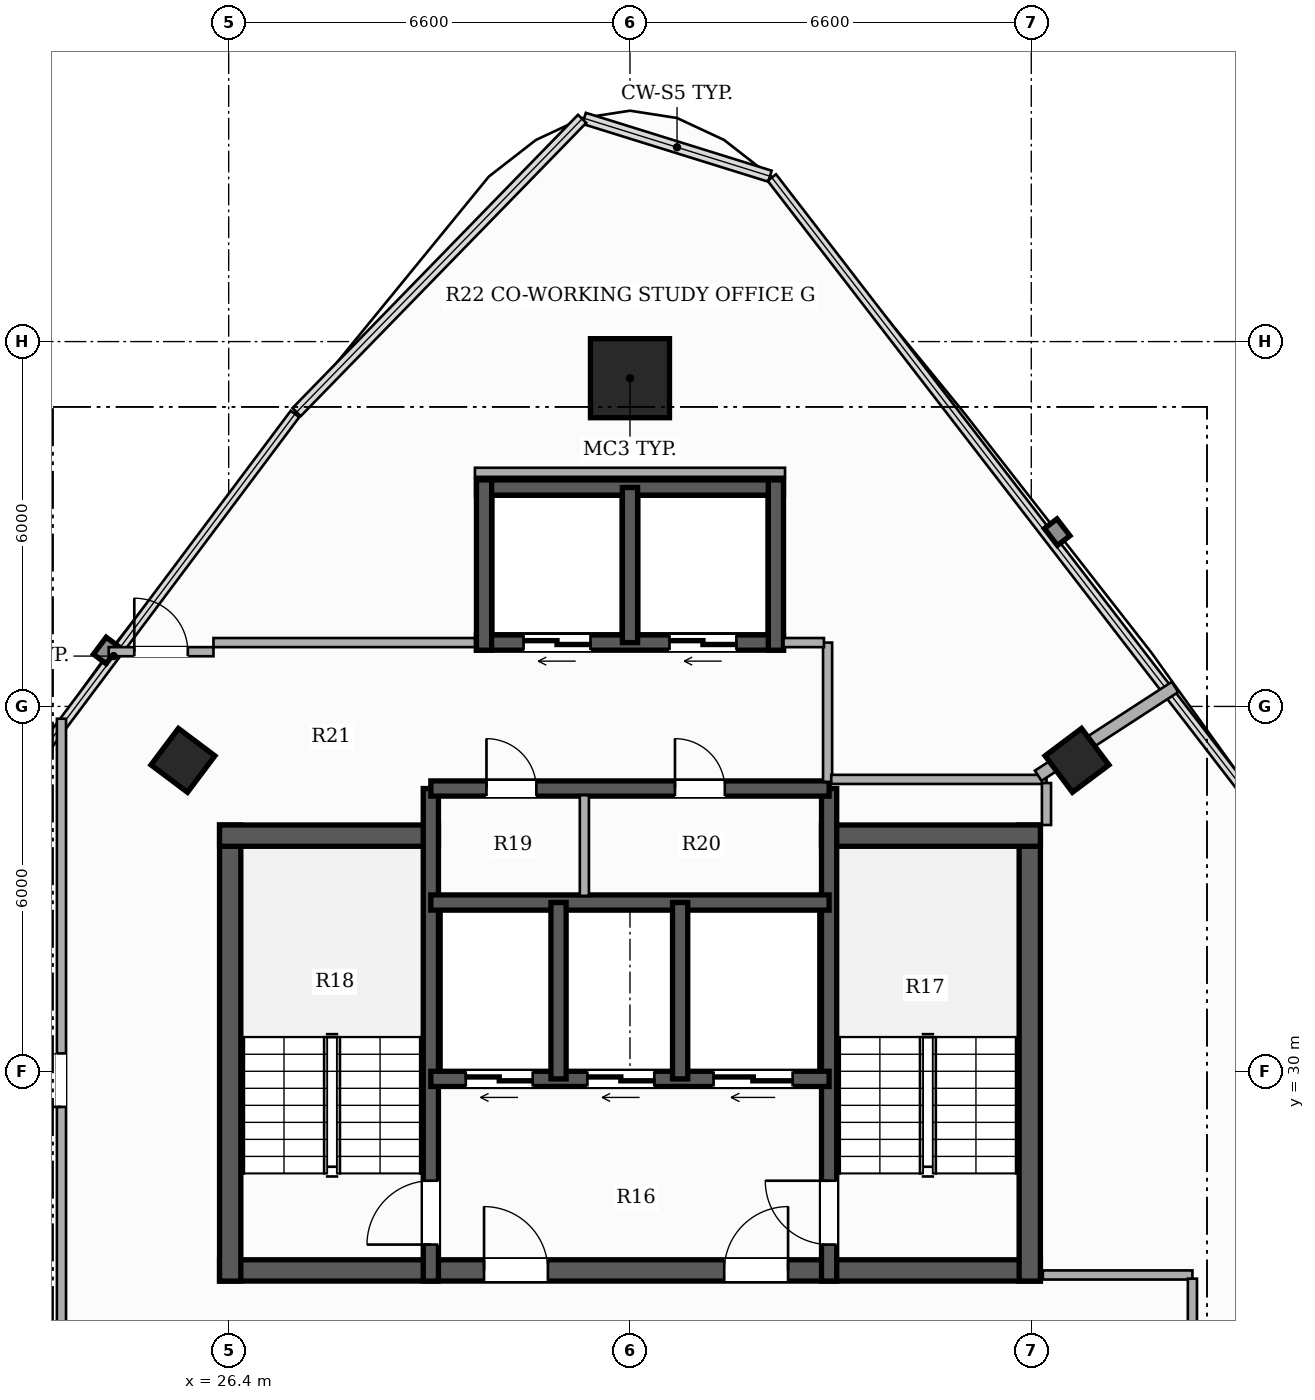
"""IFC4 building model, lengths in metres.
Left out: names, types, materials, properties, quantities, classifications, styles, units other than length and angle.
Written with IfcOpenShell. Run it as: python <this file> out.ifc"""

import sys

from ifc_helpers import new_model, si_unit, direction, frame, frame_2d, origin, origin_2d, place, context, subcontext, project, spatial, rectangle, hollow_rectangle, extrude, element, fill, save


model = new_model("IFC4")
c1 = context("Model", 3, precision=1e-05, world=origin(), true_north=direction((0.0, 1.0)))
c2 = subcontext(c1, "Body", "Model", "MODEL_VIEW")
j1 = project(units=[si_unit("LENGTHUNIT", "METRE"), si_unit("PLANEANGLEUNIT", "RADIAN")], contexts=[c1])
p1 = place(None, origin())
s1 = spatial("IfcSite", under=j1, at=p1, CompositionType="ELEMENT")
p2 = place(p1, origin())
s2 = spatial("IfcBuilding", under=s1, at=p2, CompositionType="ELEMENT")
p3 = place(p2, frame((0.0, 0.0, 229.4)))
s3 = spatial("IfcBuildingStorey", under=s2, at=p3, CompositionType="ELEMENT", Elevation=229.4)
p4 = place(p3, frame((26.25, 26.725, 0.0), z_axis=(0.0, 0.0, 1.0), x_axis=(1.0, 0.0, 0.0)))
e1 = element("IfcWall", 1, at=p4, inside=s3, PredefinedType="SHEAR", context=c2, shape_type="SweptSolid", body=[
    extrude(rectangle(XDim=13.5, YDim=0.35, at=frame_2d((6.75, 0.0))), origin(), (0.0, 0.0, 1.0), 3.3),
])
p5 = place(p4, frame((4.35, 0.0, 0.0)))
e2 = element("IfcOpeningElement", 2, at=p5, cuts=e1, PredefinedType="OPENING", context=c2, shape_type="SweptSolid", body=[
    extrude(rectangle(XDim=1.05, YDim=2.15, at=frame_2d((0.525, 1.075))), frame((0.0, 0.185, 0.0), z_axis=(0.0, -1.0, 0.0), x_axis=(1.0, 0.0, 0.0)), (0.0, 0.0, 1.0), 0.37),
])
p6 = place(p4, frame((8.3, 0.0, 0.0)))
e3 = element("IfcOpeningElement", 3, at=p6, cuts=e1, PredefinedType="OPENING", context=c2, shape_type="SweptSolid", body=[
    extrude(rectangle(XDim=1.05, YDim=2.15, at=frame_2d((0.525, 1.075))), frame((0.0, 0.185, 0.0), z_axis=(0.0, -1.0, 0.0), x_axis=(1.0, 0.0, 0.0)), (0.0, 0.0, 1.0), 0.37),
])
p7 = place(p3, frame((26.425, 26.55, 0.0), z_axis=(0.0, 0.0, 1.0), x_axis=(0.0, 1.0, 0.0)))
e4 = element("IfcWall", 4, at=p7, inside=s3, PredefinedType="SHEAR", context=c2, shape_type="SweptSolid", body=[
    extrude(rectangle(XDim=7.5, YDim=0.35, at=frame_2d((3.75, 0.0))), origin(), (0.0, 0.0, 1.0), 3.3),
])
p8 = place(p3, frame((26.25, 33.875, 0.0), z_axis=(0.0, 0.0, 1.0), x_axis=(1.0, 0.0, 0.0)))
e5 = element("IfcWall", 5, at=p8, inside=s3, PredefinedType="SHEAR", context=c2, shape_type="SweptSolid", body=[
    extrude(rectangle(XDim=3.6, YDim=0.35, at=frame_2d((1.8, 0.0))), origin(), (0.0, 0.0, 1.0), 3.3),
])
p9 = place(p3, frame((39.575, 26.55, 0.0), z_axis=(0.0, 0.0, 1.0), x_axis=(0.0, 1.0, 0.0)))
e6 = element("IfcWall", 6, at=p9, inside=s3, PredefinedType="SHEAR", context=c2, shape_type="SweptSolid", body=[
    extrude(rectangle(XDim=7.5, YDim=0.35, at=frame_2d((3.75, 0.0))), origin(), (0.0, 0.0, 1.0), 3.3),
])
p10 = place(p3, frame((36.15, 33.875, 0.0), z_axis=(0.0, 0.0, 1.0), x_axis=(1.0, 0.0, 0.0)))
e7 = element("IfcWall", 7, at=p10, inside=s3, PredefinedType="SHEAR", context=c2, shape_type="SweptSolid", body=[
    extrude(rectangle(XDim=3.6, YDim=0.35, at=frame_2d((1.8, 0.0))), origin(), (0.0, 0.0, 1.0), 3.3),
])
p11 = place(p3, frame((29.725, 26.55, 0.0), z_axis=(0.0, 0.0, 1.0), x_axis=(0.0, 1.0, 0.0)))
e8 = element("IfcWall", 8, at=p11, inside=s3, PredefinedType="SHEAR", context=c2, shape_type="SweptSolid", body=[
    extrude(rectangle(XDim=8.1, YDim=0.25, at=frame_2d((4.05, 0.0))), origin(), (0.0, 0.0, 1.0), 3.3),
])
p12 = place(p11, frame((0.6, 0.0, 0.0)))
e9 = element("IfcOpeningElement", 9, at=p12, cuts=e8, PredefinedType="OPENING", context=c2, shape_type="SweptSolid", body=[
    extrude(rectangle(XDim=1.05, YDim=2.15, at=frame_2d((0.525, 1.075))), frame((0.0, 0.135, 0.0), z_axis=(0.0, -1.0, 0.0), x_axis=(1.0, 0.0, 0.0)), (0.0, 0.0, 1.0), 0.27),
])
p13 = place(p3, frame((36.275, 26.55, 0.0), z_axis=(0.0, 0.0, 1.0), x_axis=(0.0, 1.0, 0.0)))
e10 = element("IfcWall", 10, at=p13, inside=s3, PredefinedType="SHEAR", context=c2, shape_type="SweptSolid", body=[
    extrude(rectangle(XDim=8.1, YDim=0.25, at=frame_2d((4.05, 0.0))), origin(), (0.0, 0.0, 1.0), 3.3),
])
p14 = place(p13, frame((0.6, 0.0, 0.0)))
e11 = element("IfcOpeningElement", 11, at=p14, cuts=e10, PredefinedType="OPENING", context=c2, shape_type="SweptSolid", body=[
    extrude(rectangle(XDim=1.05, YDim=2.15, at=frame_2d((0.525, 1.075))), frame((0.0, 0.135, 0.0), z_axis=(0.0, -1.0, 0.0), x_axis=(1.0, 0.0, 0.0)), (0.0, 0.0, 1.0), 0.27),
])
p15 = place(p3, frame((36.275, 29.875, 0.0), z_axis=(0.0, 0.0, 1.0), x_axis=(-1.0, 0.0, 0.0)))
e12 = element("IfcWall", 12, at=p15, inside=s3, PredefinedType="SHEAR", context=c2, shape_type="SweptSolid", body=[
    extrude(rectangle(XDim=6.55, YDim=0.25, at=frame_2d((3.275, 0.0))), origin(), (0.0, 0.0, 1.0), 3.3),
])
p16 = place(p15, frame((4.875, 0.0, 0.0)))
e13 = element("IfcOpeningElement", 13, at=p16, cuts=e12, PredefinedType="OPENING", context=c2, shape_type="SweptSolid", body=[
    extrude(rectangle(XDim=1.1, YDim=2.2, at=frame_2d((0.55, 1.1))), frame((0.0, 0.135, 0.0), z_axis=(0.0, -1.0, 0.0), x_axis=(1.0, 0.0, 0.0)), (0.0, 0.0, 1.0), 0.27),
])
p17 = place(p15, frame((2.875, 0.0, 0.0)))
e14 = element("IfcOpeningElement", 14, at=p17, cuts=e12, PredefinedType="OPENING", context=c2, shape_type="SweptSolid", body=[
    extrude(rectangle(XDim=1.1, YDim=2.2, at=frame_2d((0.55, 1.1))), frame((0.0, 0.135, 0.0), z_axis=(0.0, -1.0, 0.0), x_axis=(1.0, 0.0, 0.0)), (0.0, 0.0, 1.0), 0.27),
])
p18 = place(p15, frame((0.6, 0.0, 0.0)))
e15 = element("IfcOpeningElement", 15, at=p18, cuts=e12, PredefinedType="OPENING", context=c2, shape_type="SweptSolid", body=[
    extrude(rectangle(XDim=1.3, YDim=2.2, at=frame_2d((0.65, 1.1))), frame((0.0, 0.135, 0.0), z_axis=(0.0, -1.0, 0.0), x_axis=(1.0, 0.0, 0.0)), (0.0, 0.0, 1.0), 0.27),
])
p19 = place(p3, frame((29.725, 32.775, 0.0), z_axis=(0.0, 0.0, 1.0), x_axis=(1.0, 0.0, 0.0)))
e16 = element("IfcWall", 16, at=p19, inside=s3, PredefinedType="SHEAR", context=c2, shape_type="SweptSolid", body=[
    extrude(rectangle(XDim=6.55, YDim=0.25, at=frame_2d((3.275, 0.0))), origin(), (0.0, 0.0, 1.0), 3.3),
])
for number, where, z_axis, x_axis in (
    (17, (31.825, 29.875, 0.0), (0.0, 0.0, 1.0), (0.0, 1.0, 0.0)),
    (18, (33.825, 29.875, 0.0), (0.0, 0.0, 1.0), (0.0, 1.0, 0.0)),
):
    element("IfcWall", number, at=place(p3, frame(where, z_axis=z_axis, x_axis=x_axis)), inside=s3, PredefinedType="SHEAR", context=c2, shape_type="SweptSolid", body=[
        extrude(rectangle(XDim=2.9, YDim=0.25, at=frame_2d((1.45, 0.0))), origin(), (0.0, 0.0, 1.0), 3.3),
    ])
p20 = place(p3, frame((29.725, 34.65, 0.0), z_axis=(0.0, 0.0, 1.0), x_axis=(1.0, 0.0, 0.0)))
e19 = element("IfcWall", 19, at=p20, inside=s3, PredefinedType="SHEAR", context=c2, shape_type="SweptSolid", body=[
    extrude(rectangle(XDim=6.55, YDim=0.25, at=frame_2d((3.275, 0.0))), origin(), (0.0, 0.0, 1.0), 3.3),
])
p21 = place(p20, frame((0.915, 0.0, 0.0)))
e20 = element("IfcOpeningElement", 20, at=p21, cuts=e19, PredefinedType="OPENING", context=c2, shape_type="SweptSolid", body=[
    extrude(rectangle(XDim=0.82, YDim=2.1, at=frame_2d((0.41, 1.05))), frame((0.0, 0.135, 0.0), z_axis=(0.0, -1.0, 0.0), x_axis=(1.0, 0.0, 0.0)), (0.0, 0.0, 1.0), 0.27),
])
p22 = place(p20, frame((4.015, 0.0, 0.0)))
e21 = element("IfcOpeningElement", 21, at=p22, cuts=e19, PredefinedType="OPENING", context=c2, shape_type="SweptSolid", body=[
    extrude(rectangle(XDim=0.82, YDim=2.1, at=frame_2d((0.41, 1.05))), frame((0.0, 0.135, 0.0), z_axis=(0.0, -1.0, 0.0), x_axis=(1.0, 0.0, 0.0)), (0.0, 0.0, 1.0), 0.27),
])
p23 = place(p3, frame((35.525, 37.05, 0.0), z_axis=(0.0, 0.0, 1.0), x_axis=(-1.0, 0.0, 0.0)))
e22 = element("IfcWall", 22, at=p23, inside=s3, PredefinedType="SHEAR", context=c2, shape_type="SweptSolid", body=[
    extrude(rectangle(XDim=5.05, YDim=0.25, at=frame_2d((2.525, 0.0))), origin(), (0.0, 0.0, 1.0), 3.3),
])
p24 = place(p23, frame((3.175, 0.0, 0.0)))
e23 = element("IfcOpeningElement", 23, at=p24, cuts=e22, PredefinedType="OPENING", context=c2, shape_type="SweptSolid", body=[
    extrude(rectangle(XDim=1.1, YDim=2.2, at=frame_2d((0.55, 1.1))), frame((0.0, 0.135, 0.0), z_axis=(0.0, -1.0, 0.0), x_axis=(1.0, 0.0, 0.0)), (0.0, 0.0, 1.0), 0.27),
])
p25 = place(p23, frame((0.775, 0.0, 0.0)))
e24 = element("IfcOpeningElement", 24, at=p25, cuts=e22, PredefinedType="OPENING", context=c2, shape_type="SweptSolid", body=[
    extrude(rectangle(XDim=1.1, YDim=2.2, at=frame_2d((0.55, 1.1))), frame((0.0, 0.135, 0.0), z_axis=(0.0, -1.0, 0.0), x_axis=(1.0, 0.0, 0.0)), (0.0, 0.0, 1.0), 0.27),
])
p26 = place(p3, frame((30.475, 39.6, 0.0), z_axis=(0.0, 0.0, 1.0), x_axis=(1.0, 0.0, 0.0)))
e25 = element("IfcWall", 25, at=p26, inside=s3, PredefinedType="SHEAR", context=c2, shape_type="SweptSolid", body=[
    extrude(rectangle(XDim=5.05, YDim=0.25, at=frame_2d((2.525, 0.0))), origin(), (0.0, 0.0, 1.0), 3.3),
])
for number, where, z_axis, x_axis in (
    (26, (30.6, 36.925, 0.0), (0.0, 0.0, 1.0), (0.0, 1.0, 0.0)),
    (27, (35.4, 36.925, 0.0), (0.0, 0.0, 1.0), (0.0, 1.0, 0.0)),
):
    element("IfcWall", number, at=place(p3, frame(where, z_axis=z_axis, x_axis=x_axis)), inside=s3, PredefinedType="SHEAR", context=c2, shape_type="SweptSolid", body=[
        extrude(rectangle(XDim=2.8, YDim=0.25, at=frame_2d((1.4, 0.0))), origin(), (0.0, 0.0, 1.0), 3.3),
    ])
p27 = place(p3, frame((33.0, 37.05, 0.0), z_axis=(0.0, 0.0, 1.0), x_axis=(0.0, 1.0, 0.0)))
e28 = element("IfcWall", 28, at=p27, inside=s3, PredefinedType="SHEAR", context=c2, shape_type="SweptSolid", body=[
    extrude(rectangle(XDim=2.55, YDim=0.25, at=frame_2d((1.275, 0.0))), origin(), (0.0, 0.0, 1.0), 3.3),
])
p28 = place(p3, frame((33.0, 41.398, 0.0), z_axis=(0.0, 0.0, 1.0), x_axis=(1.0, 0.0, 0.0)))
e29 = element("IfcColumn", 29, at=p28, inside=s3, PredefinedType="COLUMN", context=c2, shape_type="SweptSolid", body=[
    extrude(hollow_rectangle(XDim=1.3, YDim=1.3, WallThickness=0.04, at=origin_2d()), origin(), (0.0, 0.0, 1.0), 3.3),
])
for number, where, z_axis, x_axis in (
    (30, (25.648, 35.113, 0.0), (0.0, 0.0, 1.0), (0.6, 0.8, 0.0)),
    (31, (40.352, 35.113, 0.0), (0.0, 0.0, 1.0), (-0.6, 0.8, 0.0)),
):
    element("IfcColumn", number, at=place(p3, frame(where, z_axis=z_axis, x_axis=x_axis)), inside=s3, PredefinedType="COLUMN", context=c2, shape_type="SweptSolid", body=[
        extrude(hollow_rectangle(XDim=0.75, YDim=0.75, WallThickness=0.025, at=origin_2d()), origin(), (0.0, 0.0, 1.0), 3.3),
    ])
p29 = place(p3, frame((36.25, 34.76, 0.0), z_axis=(0.0, 0.0, 1.0), x_axis=(0.0, 1.0, 0.0)))
e32 = element("IfcWall", 32, at=p29, inside=s3, PredefinedType="PARTITIONING", context=c2, shape_type="SweptSolid", body=[
    extrude(rectangle(XDim=2.29, YDim=0.15, at=frame_2d((1.145, 0.0))), origin(), (0.0, 0.0, 1.0), 2.425),
])
p30 = place(p3, frame((35.525, 37.05, 0.0), z_axis=(0.0, 0.0, 1.0), x_axis=(1.0, 0.0, 0.0)))
e33 = element("IfcWall", 33, at=p30, inside=s3, PredefinedType="PARTITIONING", context=c2, shape_type="SweptSolid", body=[
    extrude(rectangle(XDim=0.665, YDim=0.15, at=frame_2d((0.333, 0.0))), origin(), (0.0, 0.0, 1.0), 2.425),
])
p31 = place(p3, frame((32.25, 32.885, 0.0), z_axis=(0.0, 0.0, 1.0), x_axis=(0.0, 1.0, 0.0)))
e34 = element("IfcWall", 34, at=p31, inside=s3, PredefinedType="PARTITIONING", context=c2, shape_type="SweptSolid", body=[
    extrude(rectangle(XDim=1.655, YDim=0.15, at=frame_2d((0.828, 0.0))), origin(), (0.0, 0.0, 1.0), 3.06),
])
p32 = place(p3, frame((23.65, 23.91, 0.0), z_axis=(0.0, 0.0, 1.0), x_axis=(0.0, 1.0, 0.0)))
e35 = element("IfcWall", 35, at=p32, inside=s3, PredefinedType="PARTITIONING", context=c2, shape_type="SweptSolid", body=[
    extrude(rectangle(XDim=11.888, YDim=0.15, at=frame_2d((5.944, 0.0))), origin(), (0.0, 0.0, 1.0), 2.492),
])
p33 = place(p32, frame((5.504, 0.0, 0.0)))
e36 = element("IfcOpeningElement", 36, at=p33, cuts=e35, PredefinedType="OPENING", context=c2, shape_type="SweptSolid", body=[
    extrude(rectangle(XDim=0.88, YDim=2.1, at=frame_2d((0.44, 1.05))), frame((0.0, 0.085, 0.0), z_axis=(0.0, -1.0, 0.0), x_axis=(1.0, 0.0, 0.0)), (0.0, 0.0, 1.0), 0.17),
])
p34 = place(p3, frame((24.427, 36.9, 0.0), z_axis=(0.0, 0.0, 1.0), x_axis=(1.0, 0.0, 0.0)))
e37 = element("IfcWall", 37, at=p34, inside=s3, PredefinedType="PARTITIONING", context=c2, shape_type="SweptSolid", body=[
    extrude(rectangle(XDim=1.723, YDim=0.15, at=frame_2d((0.861, 0.0))), origin(), (0.0, 0.0, 1.0), 2.619),
])
p35 = place(p34, frame((0.421, 0.0, 0.0)))
e38 = element("IfcOpeningElement", 38, at=p35, cuts=e37, PredefinedType="OPENING", context=c2, shape_type="SweptSolid", body=[
    extrude(rectangle(XDim=0.88, YDim=2.1, at=frame_2d((0.44, 1.05))), frame((0.0, 0.085, 0.0), z_axis=(0.0, -1.0, 0.0), x_axis=(1.0, 0.0, 0.0)), (0.0, 0.0, 1.0), 0.17),
])
p36 = place(p3, frame((39.79, 26.65, 0.0), z_axis=(0.0, 0.0, 1.0), x_axis=(1.0, 0.0, 0.0)))
e39 = element("IfcWall", 39, at=p36, inside=s3, PredefinedType="PARTITIONING", context=c2, shape_type="SweptSolid", body=[
    extrude(rectangle(XDim=2.46, YDim=0.15, at=frame_2d((1.23, 0.0))), origin(), (0.0, 0.0, 1.0), 2.565),
])
p37 = place(p3, frame((42.25, 26.59, 0.0), z_axis=(0.0, 0.0, 1.0), x_axis=(0.0, -1.0, 0.0)))
e40 = element("IfcWall", 40, at=p37, inside=s3, PredefinedType="PARTITIONING", context=c2, shape_type="SweptSolid", body=[
    extrude(rectangle(XDim=2.74, YDim=0.15, at=frame_2d((1.37, 0.0))), origin(), (0.0, 0.0, 1.0), 2.773),
])
p38 = place(p37, frame((0.91, 0.0, 0.0)))
e41 = element("IfcOpeningElement", 41, at=p38, cuts=e40, PredefinedType="OPENING", context=c2, shape_type="SweptSolid", body=[
    extrude(rectangle(XDim=0.92, YDim=2.15, at=frame_2d((0.46, 1.075))), frame((0.0, 0.085, 0.0), z_axis=(0.0, -1.0, 0.0), x_axis=(1.0, 0.0, 0.0)), (0.0, 0.0, 1.0), 0.17),
])
p39 = place(p3, frame((26.15, 37.05, 0.0), z_axis=(0.0, 0.0, 1.0), x_axis=(1.0, 0.0, 0.0)))
e42 = element("IfcWall", 42, at=p39, inside=s3, PredefinedType="PARTITIONING", context=c2, shape_type="SweptSolid", body=[
    extrude(rectangle(XDim=4.3, YDim=0.15, at=frame_2d((2.15, 0.0))), origin(), (0.0, 0.0, 1.0), 2.425),
])
p40 = place(p3, frame((30.45, 39.85, 0.0), z_axis=(0.0, 0.0, 1.0), x_axis=(1.0, 0.0, 0.0)))
e43 = element("IfcWall", 43, at=p40, inside=s3, PredefinedType="PARTITIONING", context=c2, shape_type="SweptSolid", body=[
    extrude(rectangle(XDim=5.1, YDim=0.15, at=frame_2d((2.55, 0.0))), origin(), (0.0, 0.0, 1.0), 2.492),
])
p41 = place(p3, frame((36.31, 34.8, 0.0), z_axis=(0.0, 0.0, 1.0), x_axis=(1.0, 0.0, 0.0)))
e44 = element("IfcWall", 44, at=p41, inside=s3, PredefinedType="PARTITIONING", context=c2, shape_type="SweptSolid", body=[
    extrude(rectangle(XDim=3.54, YDim=0.15, at=frame_2d((1.77, 0.0))), origin(), (0.0, 0.0, 1.0), 2.425),
])
p42 = place(p3, frame((39.85, 34.74, 0.0), z_axis=(0.0, 0.0, 1.0), x_axis=(0.0, -1.0, 0.0)))
e45 = element("IfcWall", 45, at=p42, inside=s3, PredefinedType="PARTITIONING", context=c2, shape_type="SweptSolid", body=[
    extrude(rectangle(XDim=0.69, YDim=0.15, at=frame_2d((0.345, 0.0))), origin(), (0.0, 0.0, 1.0), 2.773),
])
p43 = place(p3, frame((39.714, 34.86, 0.0), z_axis=(0.0, 0.0, 1.0), x_axis=(0.838740992226, 0.54453057578, 0.0)))
e46 = element("IfcWall", 46, at=p43, inside=s3, PredefinedType="PARTITIONING", context=c2, shape_type="SweptSolid", body=[
    extrude(rectangle(XDim=2.681, YDim=0.2, at=frame_2d((1.341, 0.0))), origin(), (0.0, 0.0, 1.0), 2.492),
])
p44 = place(p12, origin())
e47 = element("IfcDoor", 47, at=p44, inside=s3, OperationType="SINGLE_SWING_LEFT", PredefinedType="DOOR", context=c2, shape_type="SweptSolid", body=[
    extrude(rectangle(XDim=1.05, YDim=2.15, at=frame_2d((0.525, 1.075))), frame((0.0, 0.025, 0.0), z_axis=(0.0, -1.0, 0.0), x_axis=(1.0, 0.0, 0.0)), (0.0, 0.0, 1.0), 0.05),
])
fill(e9, e47)
p45 = place(p14, origin())
e48 = element("IfcDoor", 48, at=p45, inside=s3, OperationType="SINGLE_SWING_RIGHT", PredefinedType="DOOR", context=c2, shape_type="SweptSolid", body=[
    extrude(rectangle(XDim=1.05, YDim=2.15, at=frame_2d((0.525, 1.075))), frame((0.0, 0.025, 0.0), z_axis=(0.0, -1.0, 0.0), x_axis=(1.0, 0.0, 0.0)), (0.0, 0.0, 1.0), 0.05),
])
fill(e11, e48)
p46 = place(p5, origin())
e49 = element("IfcDoor", 49, at=p46, inside=s3, OperationType="SINGLE_SWING_LEFT", PredefinedType="DOOR", context=c2, shape_type="SweptSolid", body=[
    extrude(rectangle(XDim=1.05, YDim=2.15, at=frame_2d((0.525, 1.075))), frame((0.0, 0.025, 0.0), z_axis=(0.0, -1.0, 0.0), x_axis=(1.0, 0.0, 0.0)), (0.0, 0.0, 1.0), 0.05),
])
fill(e2, e49)
p47 = place(p6, origin())
e50 = element("IfcDoor", 50, at=p47, inside=s3, OperationType="SINGLE_SWING_RIGHT", PredefinedType="DOOR", context=c2, shape_type="SweptSolid", body=[
    extrude(rectangle(XDim=1.05, YDim=2.15, at=frame_2d((0.525, 1.075))), frame((0.0, 0.025, 0.0), z_axis=(0.0, -1.0, 0.0), x_axis=(1.0, 0.0, 0.0)), (0.0, 0.0, 1.0), 0.05),
])
fill(e3, e50)
p48 = place(p16, origin())
e51 = element("IfcDoor", 51, at=p48, inside=s3, OperationType="DOUBLE_DOOR_SLIDING", PredefinedType="DOOR", context=c2, shape_type="SweptSolid", body=[
    extrude(rectangle(XDim=1.1, YDim=2.2, at=frame_2d((0.55, 1.1))), frame((0.0, 0.025, 0.0), z_axis=(0.0, -1.0, 0.0), x_axis=(1.0, 0.0, 0.0)), (0.0, 0.0, 1.0), 0.05),
])
fill(e13, e51)
p49 = place(p17, origin())
e52 = element("IfcDoor", 52, at=p49, inside=s3, OperationType="DOUBLE_DOOR_SLIDING", PredefinedType="DOOR", context=c2, shape_type="SweptSolid", body=[
    extrude(rectangle(XDim=1.1, YDim=2.2, at=frame_2d((0.55, 1.1))), frame((0.0, 0.025, 0.0), z_axis=(0.0, -1.0, 0.0), x_axis=(1.0, 0.0, 0.0)), (0.0, 0.0, 1.0), 0.05),
])
fill(e14, e52)
p50 = place(p18, origin())
e53 = element("IfcDoor", 53, at=p50, inside=s3, OperationType="DOUBLE_DOOR_SLIDING", PredefinedType="DOOR", context=c2, shape_type="SweptSolid", body=[
    extrude(rectangle(XDim=1.3, YDim=2.2, at=frame_2d((0.65, 1.1))), frame((0.0, 0.025, 0.0), z_axis=(0.0, -1.0, 0.0), x_axis=(1.0, 0.0, 0.0)), (0.0, 0.0, 1.0), 0.05),
])
fill(e15, e53)
p51 = place(p24, origin())
e54 = element("IfcDoor", 54, at=p51, inside=s3, OperationType="DOUBLE_DOOR_SLIDING", PredefinedType="DOOR", context=c2, shape_type="SweptSolid", body=[
    extrude(rectangle(XDim=1.1, YDim=2.2, at=frame_2d((0.55, 1.1))), frame((0.0, 0.025, 0.0), z_axis=(0.0, -1.0, 0.0), x_axis=(1.0, 0.0, 0.0)), (0.0, 0.0, 1.0), 0.05),
])
fill(e23, e54)
p52 = place(p25, origin())
e55 = element("IfcDoor", 55, at=p52, inside=s3, OperationType="DOUBLE_DOOR_SLIDING", PredefinedType="DOOR", context=c2, shape_type="SweptSolid", body=[
    extrude(rectangle(XDim=1.1, YDim=2.2, at=frame_2d((0.55, 1.1))), frame((0.0, 0.025, 0.0), z_axis=(0.0, -1.0, 0.0), x_axis=(1.0, 0.0, 0.0)), (0.0, 0.0, 1.0), 0.05),
])
fill(e24, e55)
p53 = place(p21, origin())
e56 = element("IfcDoor", 56, at=p53, inside=s3, OperationType="SINGLE_SWING_LEFT", PredefinedType="DOOR", context=c2, shape_type="SweptSolid", body=[
    extrude(rectangle(XDim=0.82, YDim=2.1, at=frame_2d((0.41, 1.05))), frame((0.0, 0.025, 0.0), z_axis=(0.0, -1.0, 0.0), x_axis=(1.0, 0.0, 0.0)), (0.0, 0.0, 1.0), 0.05),
])
fill(e20, e56)
p54 = place(p22, origin())
e57 = element("IfcDoor", 57, at=p54, inside=s3, OperationType="SINGLE_SWING_LEFT", PredefinedType="DOOR", context=c2, shape_type="SweptSolid", body=[
    extrude(rectangle(XDim=0.82, YDim=2.1, at=frame_2d((0.41, 1.05))), frame((0.0, 0.025, 0.0), z_axis=(0.0, -1.0, 0.0), x_axis=(1.0, 0.0, 0.0)), (0.0, 0.0, 1.0), 0.05),
])
fill(e21, e57)
p55 = place(p33, origin())
e58 = element("IfcDoor", 58, at=p55, inside=s3, OperationType="SINGLE_SWING_LEFT", PredefinedType="DOOR", context=c2, shape_type="SweptSolid", body=[
    extrude(rectangle(XDim=0.88, YDim=2.1, at=frame_2d((0.44, 1.05))), frame((0.0, 0.025, 0.0), z_axis=(0.0, -1.0, 0.0), x_axis=(1.0, 0.0, 0.0)), (0.0, 0.0, 1.0), 0.05),
])
fill(e36, e58)
p56 = place(p35, origin())
e59 = element("IfcDoor", 59, at=p56, inside=s3, OperationType="SINGLE_SWING_LEFT", PredefinedType="DOOR", context=c2, shape_type="SweptSolid", body=[
    extrude(rectangle(XDim=0.88, YDim=2.1, at=frame_2d((0.44, 1.05))), frame((0.0, 0.025, 0.0), z_axis=(0.0, -1.0, 0.0), x_axis=(1.0, 0.0, 0.0)), (0.0, 0.0, 1.0), 0.05),
])
fill(e38, e59)
save(model, sys.argv[1])
